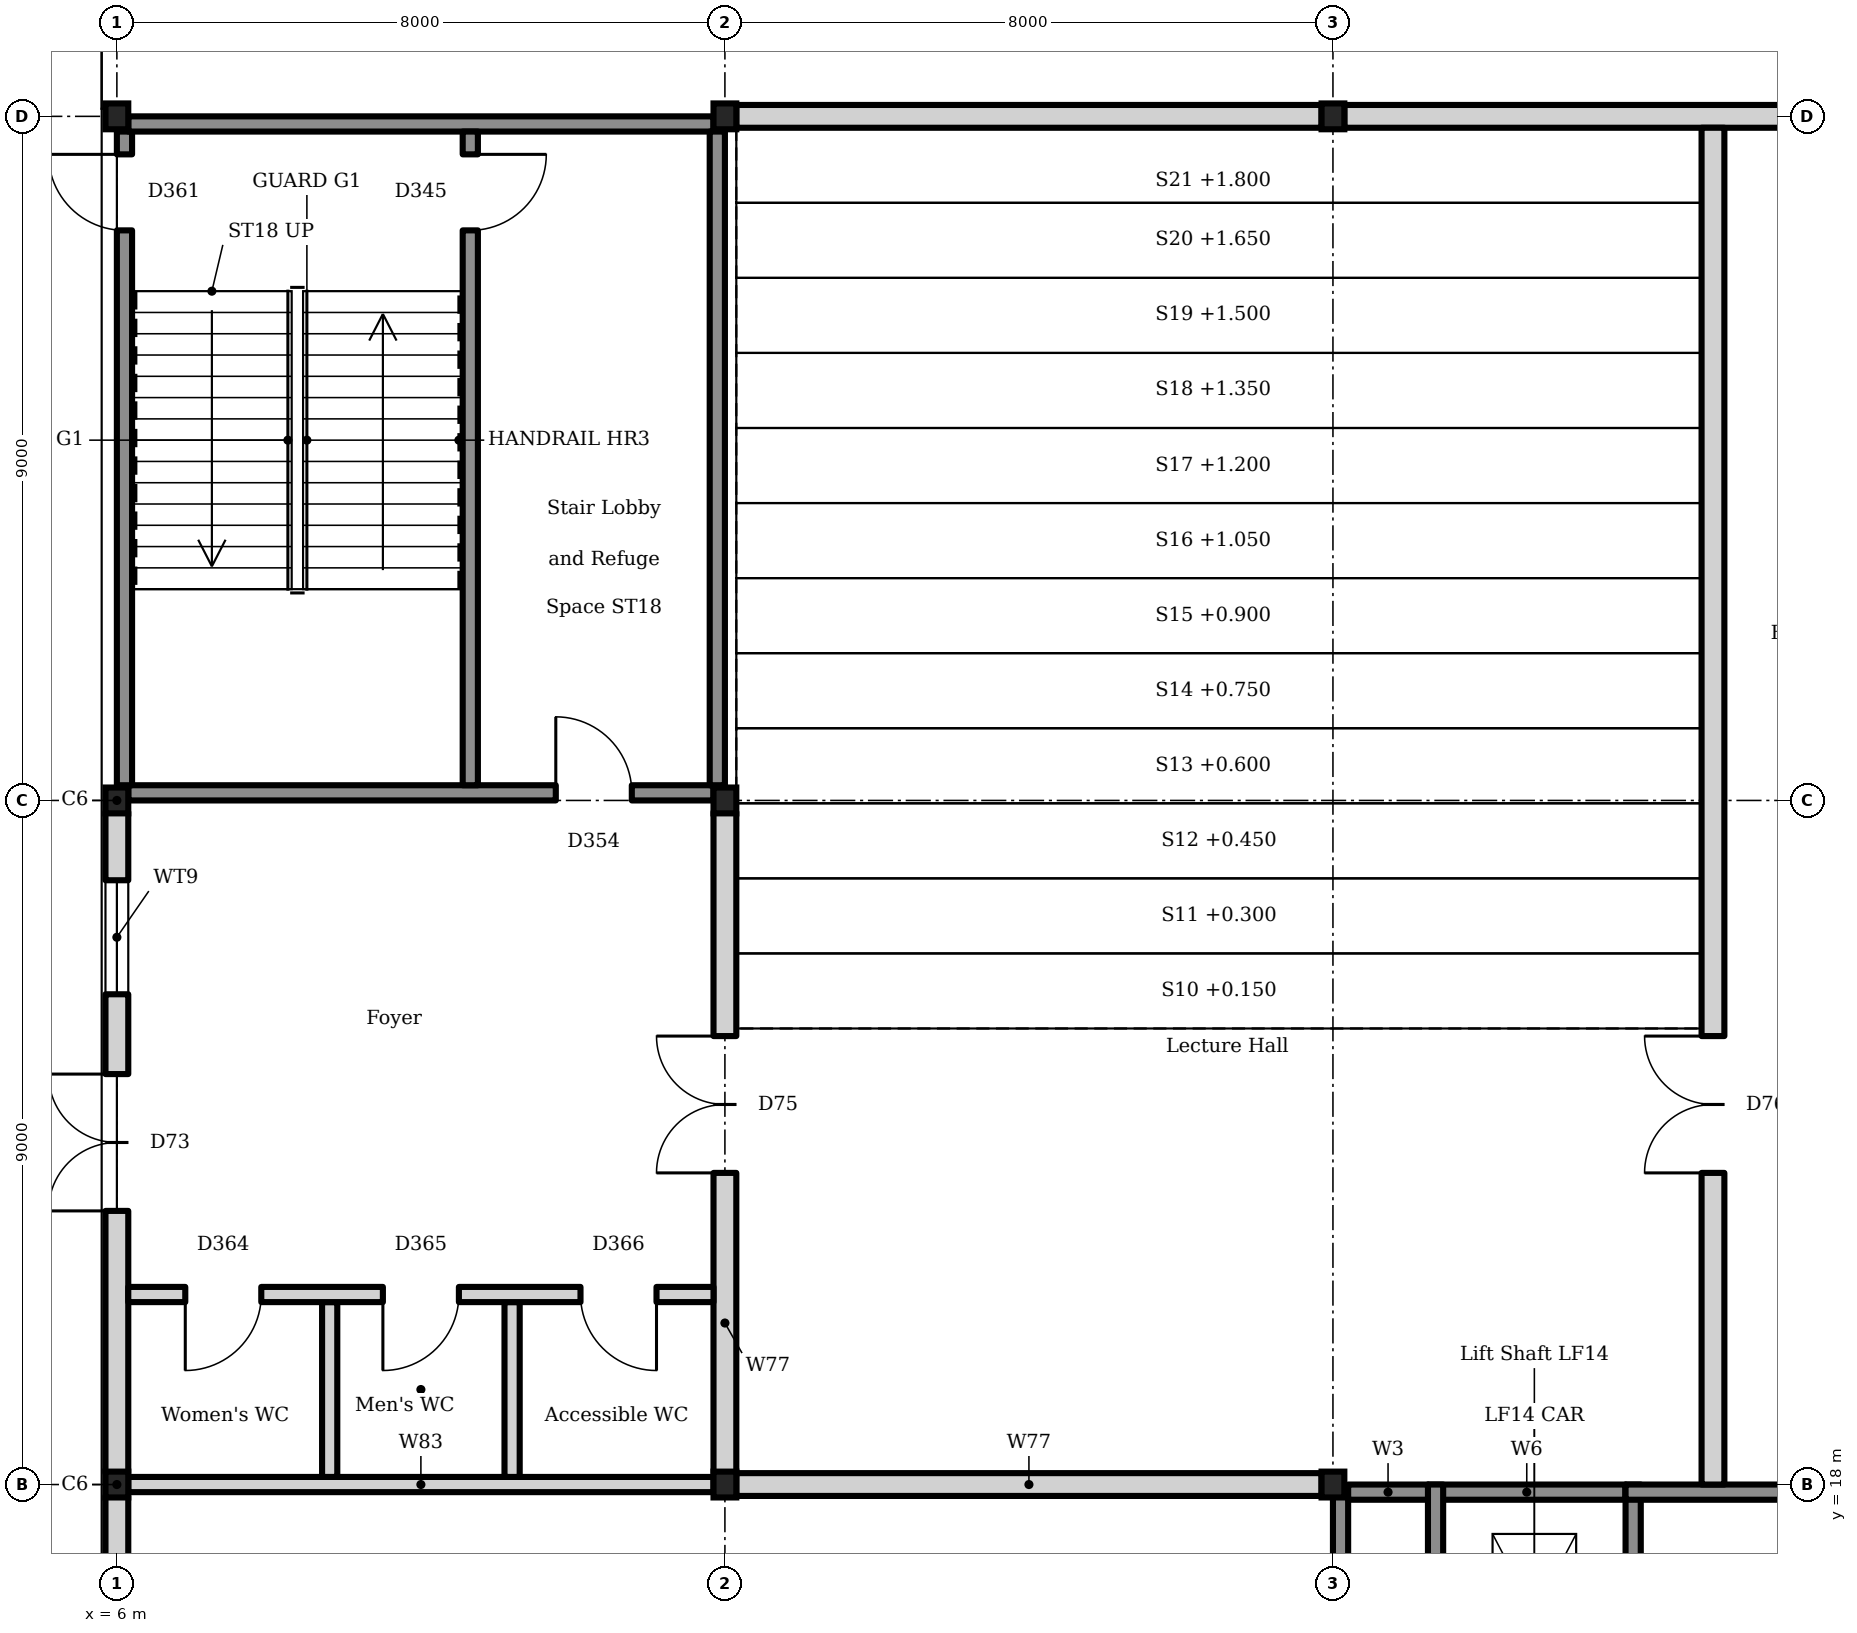
"""IFC4 building model, lengths in metres.
Left out: names, types, materials, properties, quantities, classifications, styles, units other than length and angle.
Written with IfcOpenShell. Run it as: python <this file> out.ifc"""

import sys

from ifc_helpers import new_model, si_unit, direction, frame, frame_2d, origin, origin_2d, place, context, subcontext, project, spatial, rectangle, i_section, extrude, element, fill, save


model = new_model("IFC4")
c1 = context("Model", 3, precision=1e-05, world=origin(), true_north=direction((0.0, 1.0)))
c2 = subcontext(c1, "Body", "Model", "MODEL_VIEW")
j1 = project(units=[si_unit("LENGTHUNIT", "METRE"), si_unit("PLANEANGLEUNIT", "RADIAN")], contexts=[c1])
p1 = place(None, origin())
s1 = spatial("IfcSite", under=j1, at=p1, CompositionType="ELEMENT")
p2 = place(p1, origin())
s2 = spatial("IfcBuilding", under=s1, at=p2, CompositionType="ELEMENT")
p3 = place(p2, origin())
s3 = spatial("IfcBuildingStorey", under=s2, at=p3, CompositionType="ELEMENT", Elevation=0.0)
p4 = place(p3, frame((23.25, 17.9, -1.1), z_axis=(0.0, 0.0, 1.0), x_axis=(1.0, 0.0, 0.0)))
e1 = element("IfcWall", 1, at=p4, inside=s3, PredefinedType="SOLIDWALL", context=c2, shape_type="SweptSolid", body=[
    extrude(rectangle(XDim=2.6, YDim=0.2, at=frame_2d((1.3, 0.0))), origin(), (0.0, 0.0, 1.0), 6.5),
])
for number, where, z_axis, x_axis in (
    (2, (23.35, 14.6, -1.1), (0.0, 0.0, 1.0), (0.0, 1.0, 0.0)),
    (3, (25.95, 14.6, -1.1), (0.0, 0.0, 1.0), (0.0, 1.0, 0.0)),
):
    element("IfcWall", number, at=place(p3, frame(where, z_axis=z_axis, x_axis=x_axis)), inside=s3, PredefinedType="SOLIDWALL", context=c2, shape_type="SweptSolid", body=[
        extrude(rectangle(XDim=3.4, YDim=0.2, at=frame_2d((1.7, 0.0))), origin(), (0.0, 0.0, 1.0), 6.5),
    ])
for number, where, z_axis, x_axis in (
    (4, (6.0, 18.0, 0.0), (0.0, 0.0, 1.0), (1.0, 0.0, 0.0)),
    (5, (6.0, 27.0, 0.0), (0.0, 0.0, 1.0), (1.0, 0.0, 0.0)),
    (6, (6.0, 36.0, 0.0), (0.0, 0.0, 1.0), (1.0, 0.0, 0.0)),
    (7, (14.0, 18.0, 0.0), (0.0, 0.0, 1.0), (1.0, 0.0, 0.0)),
    (8, (14.0, 27.0, 0.0), (0.0, 0.0, 1.0), (1.0, 0.0, 0.0)),
    (9, (14.0, 36.0, 0.0), (0.0, 0.0, 1.0), (1.0, 0.0, 0.0)),
    (10, (22.0, 18.0, 0.0), (0.0, 0.0, 1.0), (1.0, 0.0, 0.0)),
    (11, (22.0, 36.0, 0.0), (0.0, 0.0, 1.0), (1.0, 0.0, 0.0)),
):
    element("IfcColumn", number, at=place(p3, frame(where, z_axis=z_axis, x_axis=x_axis)), inside=s3, PredefinedType="COLUMN", context=c2, shape_type="SweptSolid", body=[
        extrude(i_section(OverallWidth=0.3, OverallDepth=0.34, WebThickness=0.012, FlangeThickness=0.021, FilletRadius=0.027, at=origin_2d()), origin(), (0.0, 0.0, 1.0), 5.4),
    ])
p5 = place(p3, frame((6.0, 14.49, 0.0), z_axis=(0.0, 0.0, 1.0), x_axis=(0.0, 1.0, 0.0)))
e12 = element("IfcWall", 12, at=p5, inside=s3, PredefinedType="SOLIDWALL", context=c2, shape_type="SweptSolid", body=[
    extrude(rectangle(XDim=3.36, YDim=0.3, at=frame_2d((1.68, 0.0))), origin(), (0.0, 0.0, 1.0), 4.72),
])
p6 = place(p5, frame((0.96, 0.0, 0.9)))
e13 = element("IfcOpeningElement", 13, at=p6, cuts=e12, PredefinedType="OPENING", context=c2, shape_type="SweptSolid", body=[
    extrude(rectangle(XDim=1.5, YDim=2.8, at=frame_2d((0.75, 1.4))), frame((0.0, 0.16, 0.0), z_axis=(0.0, -1.0, 0.0), x_axis=(1.0, 0.0, 0.0)), (0.0, 0.0, 1.0), 0.32),
])
p7 = place(p3, frame((6.0, 18.15, 0.0), z_axis=(0.0, 0.0, 1.0), x_axis=(0.0, 1.0, 0.0)))
e14 = element("IfcWall", 14, at=p7, inside=s3, PredefinedType="SOLIDWALL", context=c2, shape_type="SweptSolid", body=[
    extrude(rectangle(XDim=8.7, YDim=0.3, at=frame_2d((4.35, 0.0))), origin(), (0.0, 0.0, 1.0), 4.72),
])
p8 = place(p7, frame((3.45, 0.0, 0.0)))
e15 = element("IfcOpeningElement", 15, at=p8, cuts=e14, PredefinedType="OPENING", context=c2, shape_type="SweptSolid", body=[
    extrude(rectangle(XDim=1.8, YDim=2.4, at=frame_2d((0.9, 1.2))), frame((0.0, 0.16, 0.0), z_axis=(0.0, -1.0, 0.0), x_axis=(1.0, 0.0, 0.0)), (0.0, 0.0, 1.0), 0.32),
])
p9 = place(p7, frame((6.3, 0.0, 0.9)))
e16 = element("IfcOpeningElement", 16, at=p9, cuts=e14, PredefinedType="OPENING", context=c2, shape_type="SweptSolid", body=[
    extrude(rectangle(XDim=1.5, YDim=2.8, at=frame_2d((0.75, 1.4))), frame((0.0, 0.16, 0.0), z_axis=(0.0, -1.0, 0.0), x_axis=(1.0, 0.0, 0.0)), (0.0, 0.0, 1.0), 0.32),
])
for number, where, z_axis, x_axis in (
    (17, (14.15, 36.0, 0.0), (0.0, 0.0, 1.0), (1.0, 0.0, 0.0)),
    (18, (22.15, 36.0, 0.0), (0.0, 0.0, 1.0), (1.0, 0.0, 0.0)),
):
    element("IfcWall", number, at=place(p3, frame(where, z_axis=z_axis, x_axis=x_axis)), inside=s3, PredefinedType="SOLIDWALL", context=c2, shape_type="SweptSolid", body=[
        extrude(rectangle(XDim=7.7, YDim=0.3, at=frame_2d((3.85, 0.0))), origin(), (0.0, 0.0, 1.0), 5.2),
    ])
p10 = place(p3, frame((14.0, 18.15, 0.0), z_axis=(0.0, 0.0, 1.0), x_axis=(0.0, 1.0, 0.0)))
e19 = element("IfcWall", 19, at=p10, inside=s3, PredefinedType="SOLIDWALL", context=c2, shape_type="SweptSolid", body=[
    extrude(rectangle(XDim=8.7, YDim=0.3, at=frame_2d((4.35, 0.0))), origin(), (0.0, 0.0, 1.0), 4.72),
])
p11 = place(p10, frame((3.95, 0.0, 0.0)))
e20 = element("IfcOpeningElement", 20, at=p11, cuts=e19, PredefinedType="OPENING", context=c2, shape_type="SweptSolid", body=[
    extrude(rectangle(XDim=1.8, YDim=2.1, at=frame_2d((0.9, 1.05))), frame((0.0, 0.16, 0.0), z_axis=(0.0, -1.0, 0.0), x_axis=(1.0, 0.0, 0.0)), (0.0, 0.0, 1.0), 0.32),
])
p12 = place(p3, frame((14.15, 18.0, 0.0), z_axis=(0.0, 0.0, 1.0), x_axis=(1.0, 0.0, 0.0)))
e21 = element("IfcWall", 21, at=p12, inside=s3, PredefinedType="SOLIDWALL", context=c2, shape_type="SweptSolid", body=[
    extrude(rectangle(XDim=7.7, YDim=0.3, at=frame_2d((3.85, 0.0))), origin(), (0.0, 0.0, 1.0), 4.72),
])
p13 = place(p3, frame((27.0, 18.0, 0.0), z_axis=(0.0, 0.0, 1.0), x_axis=(0.0, 1.0, 0.0)))
e22 = element("IfcWall", 22, at=p13, inside=s3, PredefinedType="SOLIDWALL", context=c2, shape_type="SweptSolid", body=[
    extrude(rectangle(XDim=17.85, YDim=0.3, at=frame_2d((8.925, 0.0))), origin(), (0.0, 0.0, 1.0), 5.2),
])
p14 = place(p13, frame((4.1, 0.0, 0.0)))
e23 = element("IfcOpeningElement", 23, at=p14, cuts=e22, PredefinedType="OPENING", context=c2, shape_type="SweptSolid", body=[
    extrude(rectangle(XDim=1.8, YDim=2.1, at=frame_2d((0.9, 1.05))), frame((0.0, 0.16, 0.0), z_axis=(0.0, -1.0, 0.0), x_axis=(1.0, 0.0, 0.0)), (0.0, 0.0, 1.0), 0.32),
])
p15 = place(p3, frame((22.1, 9.15, 0.0), z_axis=(0.0, 0.0, 1.0), x_axis=(0.0, 1.0, 0.0)))
e24 = element("IfcWall", 24, at=p15, inside=s3, PredefinedType="SOLIDWALL", context=c2, shape_type="SweptSolid", body=[
    extrude(rectangle(XDim=8.7, YDim=0.2, at=frame_2d((4.35, 0.0))), origin(), (0.0, 0.0, 1.0), 5.2),
])
p16 = place(p3, frame((22.2, 17.9, 0.0), z_axis=(0.0, 0.0, 1.0), x_axis=(1.0, 0.0, 0.0)))
e25 = element("IfcWall", 25, at=p16, inside=s3, PredefinedType="SOLIDWALL", context=c2, shape_type="SweptSolid", body=[
    extrude(rectangle(XDim=1.05, YDim=0.2, at=frame_2d((0.525, 0.0))), origin(), (0.0, 0.0, 1.0), 5.2),
])
p17 = place(p3, frame((25.85, 17.9, 0.0), z_axis=(0.0, 0.0, 1.0), x_axis=(1.0, 0.0, 0.0)))
e26 = element("IfcWall", 26, at=p17, inside=s3, PredefinedType="SOLIDWALL", context=c2, shape_type="SweptSolid", body=[
    extrude(rectangle(XDim=3.95, YDim=0.2, at=frame_2d((1.975, 0.0))), origin(), (0.0, 0.0, 1.0), 5.2),
])
p18 = place(p3, frame((6.15, 27.1, 0.0), z_axis=(0.0, 0.0, 1.0), x_axis=(1.0, 0.0, 0.0)))
e27 = element("IfcWall", 27, at=p18, inside=s3, PredefinedType="SOLIDWALL", context=c2, shape_type="SweptSolid", body=[
    extrude(rectangle(XDim=7.7, YDim=0.2, at=frame_2d((3.85, 0.0))), origin(), (0.0, 0.0, 1.0), 5.2),
])
p19 = place(p18, frame((5.625, 0.0, 0.0)))
e28 = element("IfcOpeningElement", 28, at=p19, cuts=e27, PredefinedType="OPENING", context=c2, shape_type="SweptSolid", body=[
    extrude(rectangle(XDim=1.0, YDim=2.1, at=frame_2d((0.5, 1.05))), frame((0.0, 0.11, 0.0), z_axis=(0.0, -1.0, 0.0), x_axis=(1.0, 0.0, 0.0)), (0.0, 0.0, 1.0), 0.22),
])
p20 = place(p3, frame((6.1, 27.2, 0.0), z_axis=(0.0, 0.0, 1.0), x_axis=(0.0, 1.0, 0.0)))
e29 = element("IfcWall", 29, at=p20, inside=s3, PredefinedType="SOLIDWALL", context=c2, shape_type="SweptSolid", body=[
    extrude(rectangle(XDim=8.6, YDim=0.2, at=frame_2d((4.3, 0.0))), origin(), (0.0, 0.0, 1.0), 5.2),
])
p21 = place(p20, frame((7.3, 0.0, 0.0)))
e30 = element("IfcOpeningElement", 30, at=p21, cuts=e29, PredefinedType="OPENING", context=c2, shape_type="SweptSolid", body=[
    extrude(rectangle(XDim=1.0, YDim=2.1, at=frame_2d((0.5, 1.05))), frame((0.0, 0.11, 0.0), z_axis=(0.0, -1.0, 0.0), x_axis=(1.0, 0.0, 0.0)), (0.0, 0.0, 1.0), 0.22),
])
p22 = place(p3, frame((6.15, 35.9, 0.0), z_axis=(0.0, 0.0, 1.0), x_axis=(1.0, 0.0, 0.0)))
e31 = element("IfcWall", 31, at=p22, inside=s3, PredefinedType="SOLIDWALL", context=c2, shape_type="SweptSolid", body=[
    extrude(rectangle(XDim=7.7, YDim=0.2, at=frame_2d((3.85, 0.0))), origin(), (0.0, 0.0, 1.0), 5.2),
])
p23 = place(p3, frame((13.9, 27.2, 0.0), z_axis=(0.0, 0.0, 1.0), x_axis=(0.0, 1.0, 0.0)))
e32 = element("IfcWall", 32, at=p23, inside=s3, PredefinedType="SOLIDWALL", context=c2, shape_type="SweptSolid", body=[
    extrude(rectangle(XDim=8.6, YDim=0.2, at=frame_2d((4.3, 0.0))), origin(), (0.0, 0.0, 1.0), 5.2),
])
p24 = place(p3, frame((10.65, 27.2, 0.0), z_axis=(0.0, 0.0, 1.0), x_axis=(0.0, 1.0, 0.0)))
e33 = element("IfcWall", 33, at=p24, inside=s3, PredefinedType="SOLIDWALL", context=c2, shape_type="SweptSolid", body=[
    extrude(rectangle(XDim=8.6, YDim=0.2, at=frame_2d((4.3, 0.0))), origin(), (0.0, 0.0, 1.0), 5.2),
])
p25 = place(p24, frame((7.3, 0.0, 0.0)))
e34 = element("IfcOpeningElement", 34, at=p25, cuts=e33, PredefinedType="OPENING", context=c2, shape_type="SweptSolid", body=[
    extrude(rectangle(XDim=1.0, YDim=2.1, at=frame_2d((0.5, 1.05))), frame((0.0, 0.11, 0.0), z_axis=(0.0, -1.0, 0.0), x_axis=(1.0, 0.0, 0.0)), (0.0, 0.0, 1.0), 0.22),
])
p26 = place(p3, frame((6.15, 18.0, 0.0), z_axis=(0.0, 0.0, 1.0), x_axis=(1.0, 0.0, 0.0)))
e35 = element("IfcWall", 35, at=p26, inside=s3, PredefinedType="PARTITIONING", context=c2, shape_type="SweptSolid", body=[
    extrude(rectangle(XDim=7.7, YDim=0.2, at=frame_2d((3.85, 0.0))), origin(), (0.0, 0.0, 1.0), 4.72),
])
for number, where, z_axis, x_axis in (
    (36, (8.8, 18.1, 0.0), (0.0, 0.0, 1.0), (0.0, 1.0, 0.0)),
    (37, (11.2, 18.1, 0.0), (0.0, 0.0, 1.0), (0.0, 1.0, 0.0)),
):
    element("IfcWall", number, at=place(p3, frame(where, z_axis=z_axis, x_axis=x_axis)), inside=s3, PredefinedType="PARTITIONING", context=c2, shape_type="SweptSolid", body=[
        extrude(rectangle(XDim=2.3, YDim=0.2, at=frame_2d((1.15, 0.0))), origin(), (0.0, 0.0, 1.0), 5.2),
    ])
p27 = place(p3, frame((6.15, 20.5, 0.0), z_axis=(0.0, 0.0, 1.0), x_axis=(1.0, 0.0, 0.0)))
e38 = element("IfcWall", 38, at=p27, inside=s3, PredefinedType="PARTITIONING", context=c2, shape_type="SweptSolid", body=[
    extrude(rectangle(XDim=7.7, YDim=0.2, at=frame_2d((3.85, 0.0))), origin(), (0.0, 0.0, 1.0), 5.2),
])
p28 = place(p27, frame((0.75, 0.0, 0.0)))
e39 = element("IfcOpeningElement", 39, at=p28, cuts=e38, PredefinedType="OPENING", context=c2, shape_type="SweptSolid", body=[
    extrude(rectangle(XDim=1.0, YDim=2.1, at=frame_2d((0.5, 1.05))), frame((0.0, 0.11, 0.0), z_axis=(0.0, -1.0, 0.0), x_axis=(1.0, 0.0, 0.0)), (0.0, 0.0, 1.0), 0.22),
])
p29 = place(p27, frame((3.35, 0.0, 0.0)))
e40 = element("IfcOpeningElement", 40, at=p29, cuts=e38, PredefinedType="OPENING", context=c2, shape_type="SweptSolid", body=[
    extrude(rectangle(XDim=1.0, YDim=2.1, at=frame_2d((0.5, 1.05))), frame((0.0, 0.11, 0.0), z_axis=(0.0, -1.0, 0.0), x_axis=(1.0, 0.0, 0.0)), (0.0, 0.0, 1.0), 0.22),
])
p30 = place(p27, frame((5.95, 0.0, 0.0)))
e41 = element("IfcOpeningElement", 41, at=p30, cuts=e38, PredefinedType="OPENING", context=c2, shape_type="SweptSolid", body=[
    extrude(rectangle(XDim=1.0, YDim=2.1, at=frame_2d((0.5, 1.05))), frame((0.0, 0.11, 0.0), z_axis=(0.0, -1.0, 0.0), x_axis=(1.0, 0.0, 0.0)), (0.0, 0.0, 1.0), 0.22),
])
p31 = place(p8, origin())
e42 = element("IfcDoor", 42, at=p31, inside=s3, OperationType="DOUBLE_DOOR_SINGLE_SWING", PredefinedType="DOOR", context=c2, shape_type="SweptSolid", body=[
    extrude(rectangle(XDim=1.8, YDim=2.4, at=frame_2d((0.9, 1.2))), frame((0.0, 0.025, 0.0), z_axis=(0.0, -1.0, 0.0), x_axis=(1.0, 0.0, 0.0)), (0.0, 0.0, 1.0), 0.05),
])
fill(e15, e42)
p32 = place(p9, origin())
e43 = element("IfcWindow", 43, at=p32, inside=s3, PartitioningType="SINGLE_PANEL", PredefinedType="WINDOW", context=c2, shape_type="SweptSolid", body=[
    extrude(rectangle(XDim=1.5, YDim=2.8, at=frame_2d((0.75, 1.4))), frame((0.0, 0.03, 0.0), z_axis=(0.0, -1.0, 0.0), x_axis=(1.0, 0.0, 0.0)), (0.0, 0.0, 1.0), 0.06),
])
fill(e16, e43)
p33 = place(p11, origin())
e44 = element("IfcDoor", 44, at=p33, inside=s3, OperationType="DOUBLE_DOOR_SINGLE_SWING", PredefinedType="DOOR", context=c2, shape_type="SweptSolid", body=[
    extrude(rectangle(XDim=1.8, YDim=2.1, at=frame_2d((0.9, 1.05))), frame((0.0, 0.025, 0.0), z_axis=(0.0, -1.0, 0.0), x_axis=(1.0, 0.0, 0.0)), (0.0, 0.0, 1.0), 0.05),
])
fill(e20, e44)
p34 = place(p14, origin())
e45 = element("IfcDoor", 45, at=p34, inside=s3, OperationType="DOUBLE_DOOR_SINGLE_SWING", PredefinedType="DOOR", context=c2, shape_type="SweptSolid", body=[
    extrude(rectangle(XDim=1.8, YDim=2.1, at=frame_2d((0.9, 1.05))), frame((0.0, 0.025, 0.0), z_axis=(0.0, -1.0, 0.0), x_axis=(1.0, 0.0, 0.0)), (0.0, 0.0, 1.0), 0.05),
])
fill(e23, e45)
p35 = place(p25, frame((1.0, 0.0, 0.0), z_axis=(0.0, 0.0, 1.0), x_axis=(-1.0, 0.0, 0.0)))
e46 = element("IfcDoor", 46, at=p35, inside=s3, OperationType="SINGLE_SWING_RIGHT", PredefinedType="DOOR", context=c2, shape_type="SweptSolid", body=[
    extrude(rectangle(XDim=1.0, YDim=2.1, at=frame_2d((0.5, 1.05))), frame((0.0, 0.025, 0.0), z_axis=(0.0, -1.0, 0.0), x_axis=(1.0, 0.0, 0.0)), (0.0, 0.0, 1.0), 0.05),
])
fill(e34, e46)
p36 = place(p19, origin())
e47 = element("IfcDoor", 47, at=p36, inside=s3, OperationType="SINGLE_SWING_RIGHT", PredefinedType="DOOR", context=c2, shape_type="SweptSolid", body=[
    extrude(rectangle(XDim=1.0, YDim=2.1, at=frame_2d((0.5, 1.05))), frame((0.0, 0.025, 0.0), z_axis=(0.0, -1.0, 0.0), x_axis=(1.0, 0.0, 0.0)), (0.0, 0.0, 1.0), 0.05),
])
fill(e28, e47)
p37 = place(p21, origin())
e48 = element("IfcDoor", 48, at=p37, inside=s3, OperationType="SINGLE_SWING_LEFT", PredefinedType="DOOR", context=c2, shape_type="SweptSolid", body=[
    extrude(rectangle(XDim=1.0, YDim=2.1, at=frame_2d((0.5, 1.05))), frame((0.0, 0.025, 0.0), z_axis=(0.0, -1.0, 0.0), x_axis=(1.0, 0.0, 0.0)), (0.0, 0.0, 1.0), 0.05),
])
fill(e30, e48)
p38 = place(p28, frame((1.0, 0.0, 0.0), z_axis=(0.0, 0.0, 1.0), x_axis=(-1.0, 0.0, 0.0)))
e49 = element("IfcDoor", 49, at=p38, inside=s3, OperationType="SINGLE_SWING_LEFT", PredefinedType="DOOR", context=c2, shape_type="SweptSolid", body=[
    extrude(rectangle(XDim=1.0, YDim=2.1, at=frame_2d((0.5, 1.05))), frame((0.0, 0.025, 0.0), z_axis=(0.0, -1.0, 0.0), x_axis=(1.0, 0.0, 0.0)), (0.0, 0.0, 1.0), 0.05),
])
fill(e39, e49)
p39 = place(p29, frame((1.0, 0.0, 0.0), z_axis=(0.0, 0.0, 1.0), x_axis=(-1.0, 0.0, 0.0)))
e50 = element("IfcDoor", 50, at=p39, inside=s3, OperationType="SINGLE_SWING_LEFT", PredefinedType="DOOR", context=c2, shape_type="SweptSolid", body=[
    extrude(rectangle(XDim=1.0, YDim=2.1, at=frame_2d((0.5, 1.05))), frame((0.0, 0.025, 0.0), z_axis=(0.0, -1.0, 0.0), x_axis=(1.0, 0.0, 0.0)), (0.0, 0.0, 1.0), 0.05),
])
fill(e40, e50)
p40 = place(p30, frame((1.0, 0.0, 0.0), z_axis=(0.0, 0.0, 1.0), x_axis=(-1.0, 0.0, 0.0)))
e51 = element("IfcDoor", 51, at=p40, inside=s3, OperationType="SINGLE_SWING_RIGHT", PredefinedType="DOOR", context=c2, shape_type="SweptSolid", body=[
    extrude(rectangle(XDim=1.0, YDim=2.1, at=frame_2d((0.5, 1.05))), frame((0.0, 0.025, 0.0), z_axis=(0.0, -1.0, 0.0), x_axis=(1.0, 0.0, 0.0)), (0.0, 0.0, 1.0), 0.05),
])
fill(e41, e51)
save(model, sys.argv[1])
